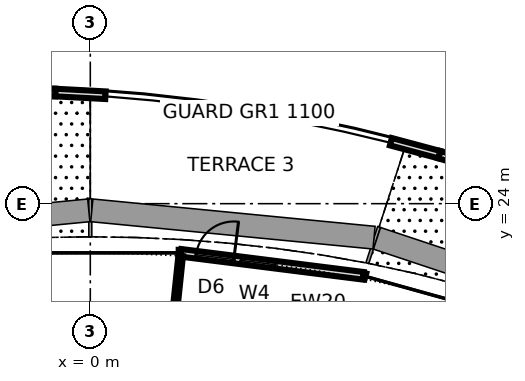
"""IFC4 building model, lengths in metres.
Left out: names, types, materials, properties, quantities, classifications, styles, units other than length and angle.
Written with IfcOpenShell. Run it as: python <this file> out.ifc"""

import sys

from ifc_helpers import new_model, si_unit, direction, frame, frame_2d, origin, place, context, subcontext, project, spatial, rectangle, extrude, element, fill, save


model = new_model("IFC4")
c1 = context("Model", 3, precision=1e-05, world=origin(), true_north=direction((0.0, 1.0)))
c2 = subcontext(c1, "Body", "Model", "MODEL_VIEW")
j1 = project(units=[si_unit("LENGTHUNIT", "METRE"), si_unit("PLANEANGLEUNIT", "RADIAN")], contexts=[c1])
p1 = place(None, origin())
s1 = spatial("IfcSite", under=j1, at=p1, CompositionType="ELEMENT")
p2 = place(p1, origin())
s2 = spatial("IfcBuilding", under=s1, at=p2, CompositionType="ELEMENT")
p3 = place(p2, frame((0.0, 0.0, 19.6)))
s3 = spatial("IfcBuildingStorey", under=s2, at=p3, CompositionType="ELEMENT", Elevation=19.6)
p4 = place(p3, frame((7.182, 22.103, 0.0), z_axis=(0.0, 0.0, 1.0), x_axis=(-0.992172605172, 0.124874022707, 0.0)))
e1 = element("IfcWall", 1, at=p4, inside=s3, PredefinedType="SOLIDWALL", context=c2, shape_type="SweptSolid", body=[
    extrude(rectangle(XDim=4.833, YDim=0.2, at=frame_2d((2.417, 0.0))), origin(), (0.0, 0.0, 1.0), 4.04),
])
p5 = place(p4, frame((3.433, 0.0, 0.0)))
e2 = element("IfcOpeningElement", 2, at=p5, cuts=e1, PredefinedType="OPENING", context=c2, shape_type="SweptSolid", body=[
    extrude(rectangle(XDim=1.0, YDim=2.4, at=frame_2d((0.5, 1.2))), frame((0.0, 0.11, 0.0), z_axis=(0.0, -1.0, 0.0), x_axis=(1.0, 0.0, 0.0)), (0.0, 0.0, 1.0), 0.22),
])
p6 = place(p4, frame((2.333, 0.0, 0.3)))
e3 = element("IfcOpeningElement", 3, at=p6, cuts=e1, PredefinedType="OPENING", context=c2, shape_type="SweptSolid", body=[
    extrude(rectangle(XDim=0.9, YDim=2.1, at=frame_2d((0.45, 1.05))), frame((0.0, 0.11, 0.0), z_axis=(0.0, -1.0, 0.0), x_axis=(1.0, 0.0, 0.0)), (0.0, 0.0, 1.0), 0.22),
])
p7 = place(p4, frame((3.433, 0.0, 2.7)))
e4 = element("IfcOpeningElement", 4, at=p7, cuts=e1, PredefinedType="OPENING", context=c2, shape_type="SweptSolid", body=[
    extrude(rectangle(XDim=1.0, YDim=0.6, at=frame_2d((0.5, 0.3))), frame((0.0, 0.11, 0.0), z_axis=(0.0, -1.0, 0.0), x_axis=(1.0, 0.0, 0.0)), (0.0, 0.0, 1.0), 0.22),
])
p8 = place(p3, frame((10.456, 24.91, 0.0), z_axis=(0.0, 0.0, 1.0), x_axis=(-0.958336385845, 0.28564203396, 0.0)))
e5 = element("IfcWall", 5, at=p8, inside=s3, PredefinedType="PARAPET", context=c2, shape_type="SweptSolid", body=[
    extrude(rectangle(XDim=1.326, YDim=0.2, at=frame_2d((0.663, 0.0))), origin(), (0.0, 0.0, 1.0), 1.1),
])
p9 = place(p3, frame((9.184, 25.289, 0.0), z_axis=(0.0, 0.0, 1.0), x_axis=(-0.965982716876, 0.258606633128, 0.0)))
e6 = element("IfcWall", 6, at=p9, inside=s3, PredefinedType="PARAPET", context=c2, shape_type="SweptSolid", body=[
    extrude(rectangle(XDim=1.32, YDim=0.2, at=frame_2d((0.66, 0.0))), origin(), (0.0, 0.0, 1.0), 1.1),
])
p10 = place(p3, frame((0.398, 26.854, 0.0), z_axis=(0.0, 0.0, 1.0), x_axis=(-0.99857464304, 0.053373048241, 0.0)))
e7 = element("IfcWall", 7, at=p10, inside=s3, PredefinedType="PARAPET", context=c2, shape_type="SweptSolid", body=[
    extrude(rectangle(XDim=1.322, YDim=0.2, at=frame_2d((0.661, 0.0))), origin(), (0.0, 0.0, 1.0), 1.1),
])
p11 = place(p3, frame((-0.922, 26.925, 0.0), z_axis=(0.0, 0.0, 1.0), x_axis=(-0.999830900949, 0.018389385708, 0.0)))
e8 = element("IfcWall", 8, at=p11, inside=s3, PredefinedType="PARAPET", context=c2, shape_type="SweptSolid", body=[
    extrude(rectangle(XDim=1.328, YDim=0.2, at=frame_2d((0.664, 0.0))), origin(), (0.0, 0.0, 1.0), 1.1),
])
p12 = place(p3, frame((0.999, 9.5, 0.0), z_axis=(0.0, 0.0, 1.0), x_axis=(0.104527835502, 0.994521961349, 0.0)))
e9 = element("IfcWall", 9, at=p12, inside=s3, PredefinedType="PARTITIONING", context=c2, shape_type="SweptSolid", body=[
    extrude(rectangle(XDim=13.199, YDim=0.12, at=frame_2d((6.599, 0.0))), origin(), (0.0, 0.0, 1.0), 4.04),
])
p13 = place(p5, frame((1.0, 0.0, 0.0), z_axis=(0.0, 0.0, 1.0), x_axis=(-1.0, 0.0, 0.0)))
e10 = element("IfcDoor", 10, at=p13, inside=s3, OperationType="SINGLE_SWING_RIGHT", PredefinedType="DOOR", context=c2, shape_type="SweptSolid", body=[
    extrude(rectangle(XDim=1.0, YDim=2.4, at=frame_2d((0.5, 1.2))), frame((0.0, 0.025, 0.0), z_axis=(0.0, -1.0, 0.0), x_axis=(1.0, 0.0, 0.0)), (0.0, 0.0, 1.0), 0.05),
])
fill(e2, e10)
p14 = place(p6, origin())
e11 = element("IfcWindow", 11, at=p14, inside=s3, PartitioningType="SINGLE_PANEL", PredefinedType="WINDOW", context=c2, shape_type="SweptSolid", body=[
    extrude(rectangle(XDim=0.9, YDim=2.1, at=frame_2d((0.45, 1.05))), frame((0.0, 0.03, 0.0), z_axis=(0.0, -1.0, 0.0), x_axis=(1.0, 0.0, 0.0)), (0.0, 0.0, 1.0), 0.06),
])
fill(e3, e11)
p15 = place(p7, origin())
e12 = element("IfcWindow", 12, at=p15, inside=s3, PartitioningType="SINGLE_PANEL", PredefinedType="WINDOW", context=c2, shape_type="SweptSolid", body=[
    extrude(rectangle(XDim=1.0, YDim=0.6, at=frame_2d((0.5, 0.3))), frame((0.0, 0.03, 0.0), z_axis=(0.0, -1.0, 0.0), x_axis=(1.0, 0.0, 0.0)), (0.0, 0.0, 1.0), 0.06),
])
fill(e4, e12)
save(model, sys.argv[1])
